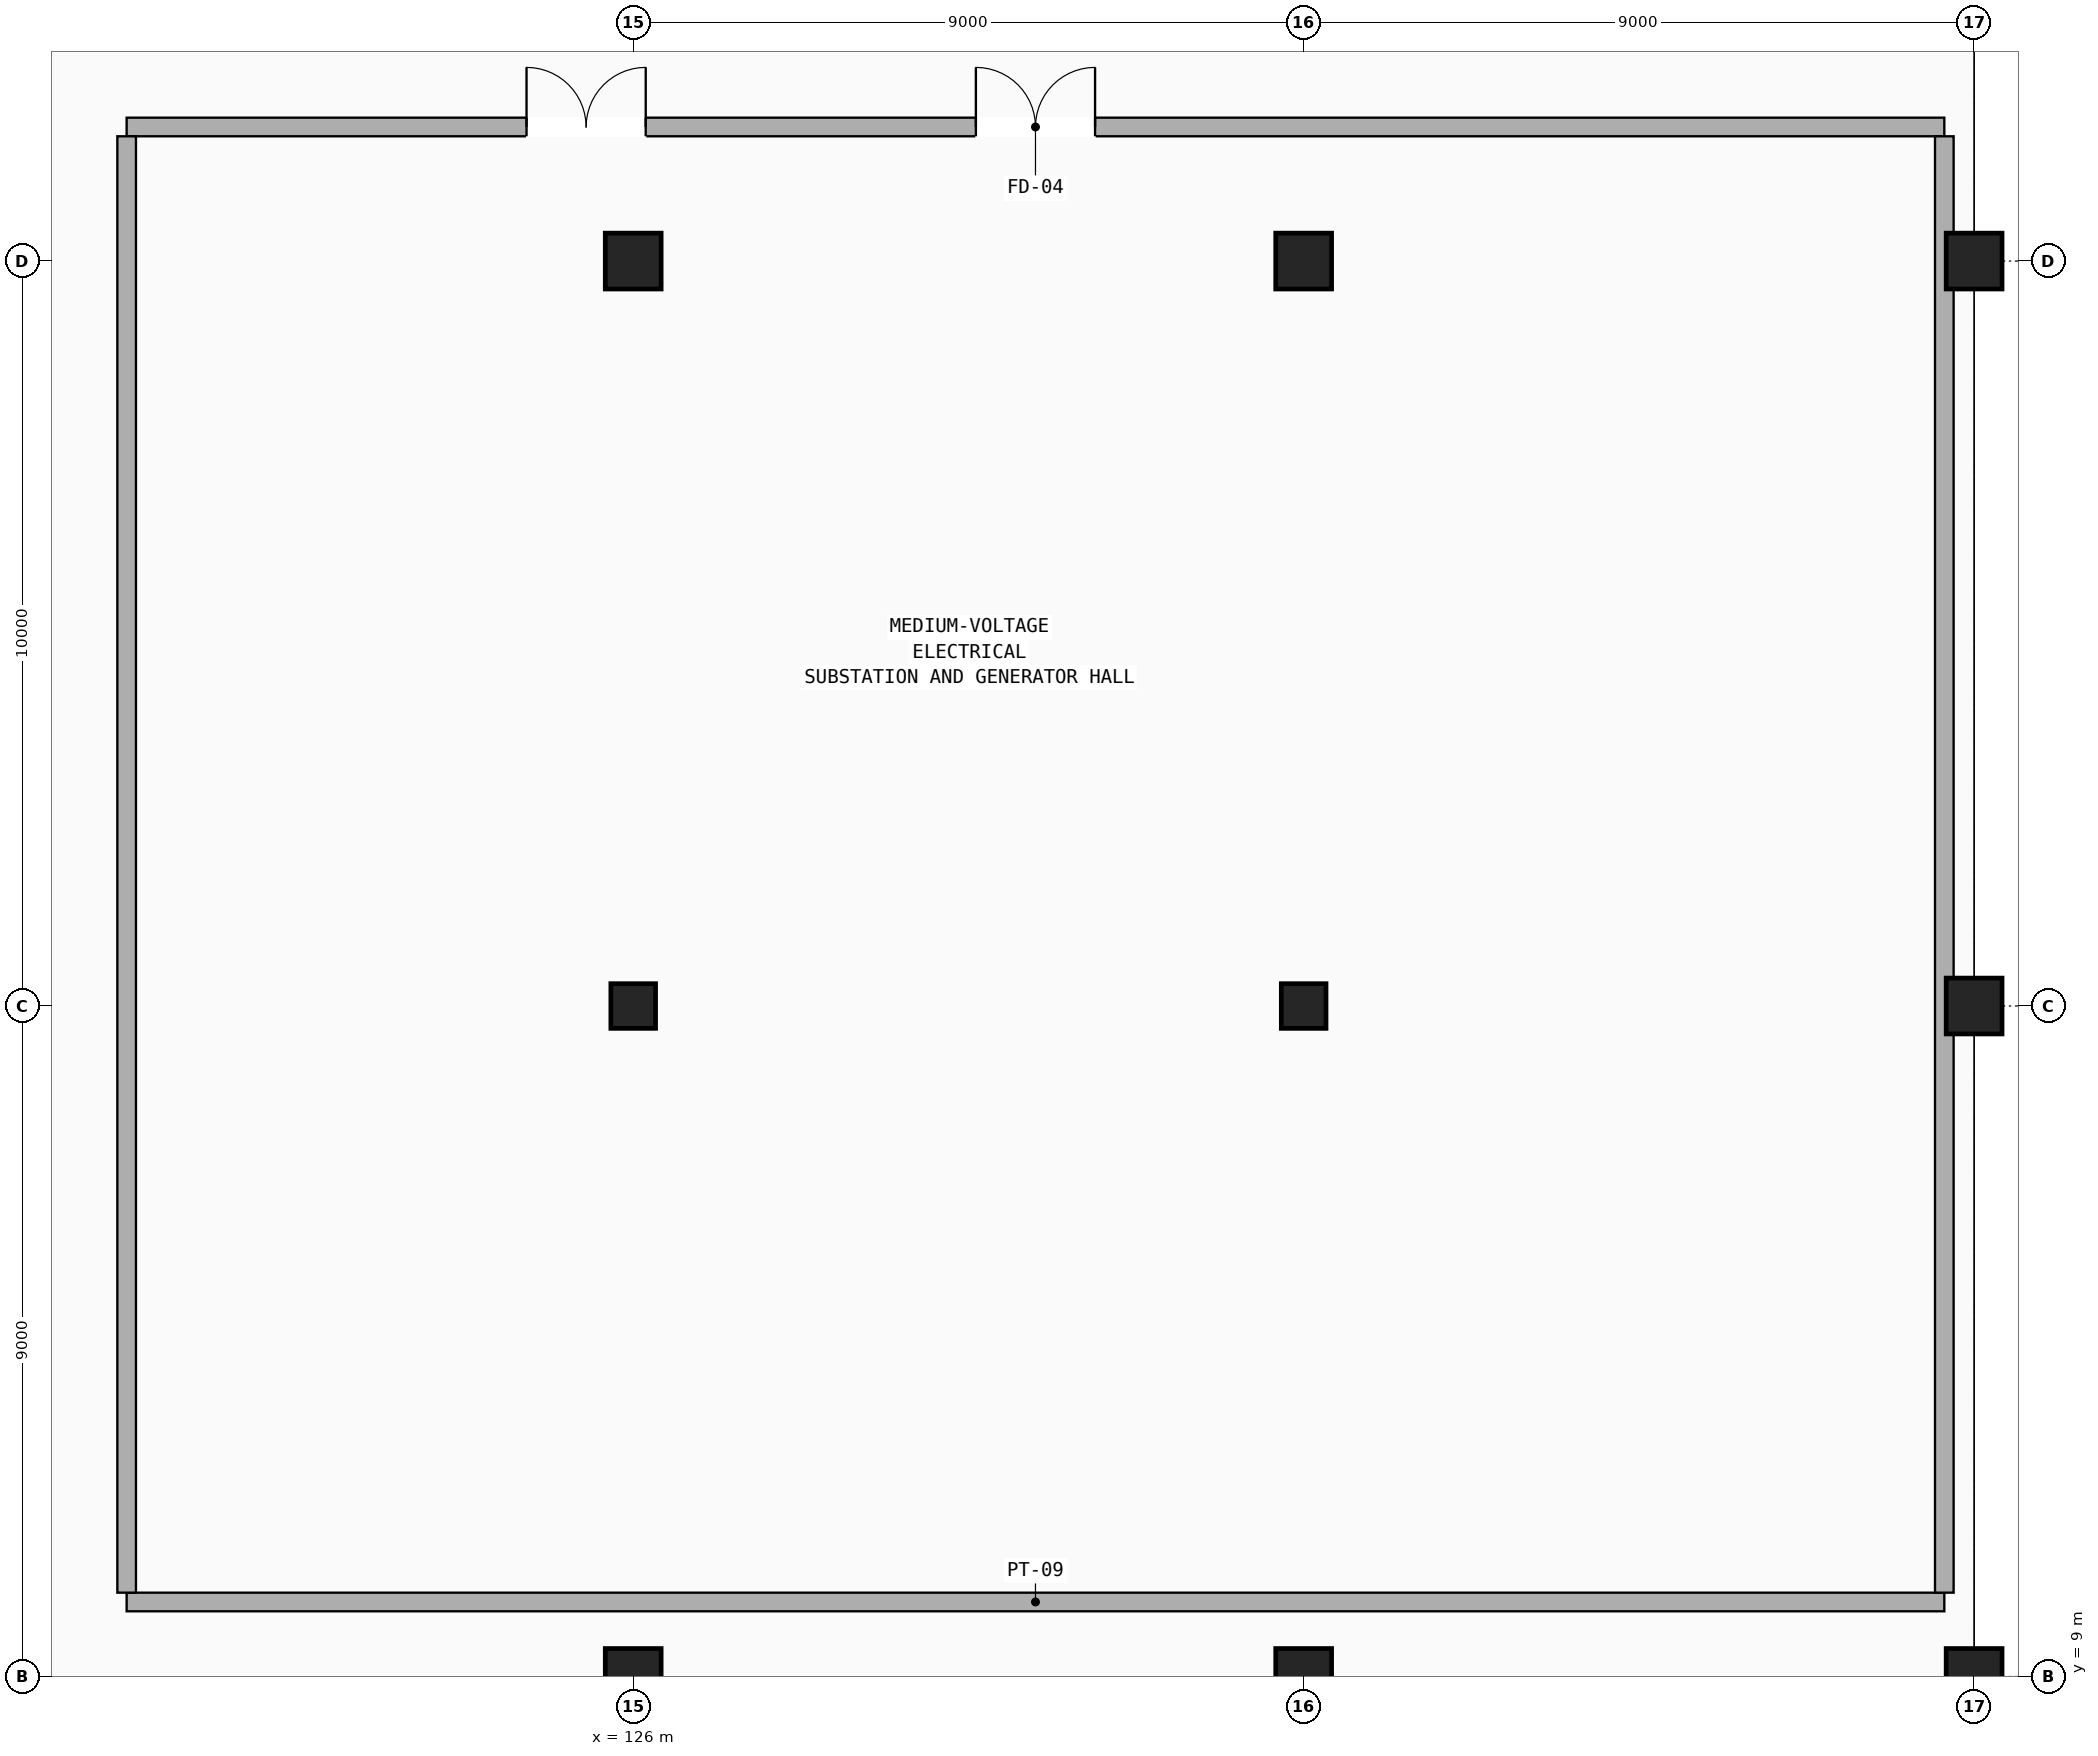
"""IFC4 building model, lengths in metres.
Left out: names, types, materials, properties, quantities, classifications, styles, units other than length and angle.
Written with IfcOpenShell. Run it as: python <this file> out.ifc"""

import sys

from ifc_helpers import new_model, si_unit, direction, frame, frame_2d, origin, origin_2d, place, context, subcontext, project, spatial, rectangle, extrude, element, fill, save


model = new_model("IFC4")
c1 = context("Model", 3, precision=1e-05, world=origin(), true_north=direction((0.0, 1.0)))
c2 = subcontext(c1, "Body", "Model", "MODEL_VIEW")
j1 = project(units=[si_unit("LENGTHUNIT", "METRE"), si_unit("PLANEANGLEUNIT", "RADIAN")], contexts=[c1])
p1 = place(None, origin())
s1 = spatial("IfcSite", under=j1, at=p1, CompositionType="ELEMENT")
p2 = place(p1, origin())
s2 = spatial("IfcBuilding", under=s1, at=p2, CompositionType="ELEMENT")
p3 = place(p2, frame((0.0, 0.0, -5.1)))
s3 = spatial("IfcBuildingStorey", under=s2, at=p3, CompositionType="ELEMENT", Elevation=-5.1)
p4 = place(p3, frame((126.0, 9.0, 0.0), z_axis=(0.0, 0.0, 1.0), x_axis=(1.0, 0.0, 0.0)))
e1 = element("IfcColumn", 1, at=p4, inside=s3, PredefinedType="COLUMN", context=c2, shape_type="SweptSolid", body=[
    extrude(rectangle(XDim=0.75, YDim=0.75, at=origin_2d()), origin(), (0.0, 0.0, 1.0), 5.1),
])
p5 = place(p3, frame((126.0, 18.0, 0.0), z_axis=(0.0, 0.0, 1.0), x_axis=(1.0, 0.0, 0.0)))
e2 = element("IfcColumn", 2, at=p5, inside=s3, PredefinedType="COLUMN", context=c2, shape_type="SweptSolid", body=[
    extrude(rectangle(XDim=0.6, YDim=0.6, at=origin_2d()), origin(), (0.0, 0.0, 1.0), 5.1),
])
for number, where, z_axis, x_axis in (
    (3, (126.0, 28.0, 0.0), (0.0, 0.0, 1.0), (1.0, 0.0, 0.0)),
    (4, (135.0, 9.0, 0.0), (0.0, 0.0, 1.0), (1.0, 0.0, 0.0)),
):
    element("IfcColumn", number, at=place(p3, frame(where, z_axis=z_axis, x_axis=x_axis)), inside=s3, PredefinedType="COLUMN", context=c2, shape_type="SweptSolid", body=[
        extrude(rectangle(XDim=0.75, YDim=0.75, at=origin_2d()), origin(), (0.0, 0.0, 1.0), 5.1),
    ])
p6 = place(p3, frame((135.0, 18.0, 0.0), z_axis=(0.0, 0.0, 1.0), x_axis=(1.0, 0.0, 0.0)))
e5 = element("IfcColumn", 5, at=p6, inside=s3, PredefinedType="COLUMN", context=c2, shape_type="SweptSolid", body=[
    extrude(rectangle(XDim=0.6, YDim=0.6, at=origin_2d()), origin(), (0.0, 0.0, 1.0), 5.1),
])
for number, where, z_axis, x_axis in (
    (6, (135.0, 28.0, 0.0), (0.0, 0.0, 1.0), (1.0, 0.0, 0.0)),
    (7, (144.0, 9.0, 0.0), (0.0, 0.0, 1.0), (1.0, 0.0, 0.0)),
    (8, (144.0, 18.0, 0.0), (0.0, 0.0, 1.0), (1.0, 0.0, 0.0)),
    (9, (144.0, 28.0, 0.0), (0.0, 0.0, 1.0), (1.0, 0.0, 0.0)),
):
    element("IfcColumn", number, at=place(p3, frame(where, z_axis=z_axis, x_axis=x_axis)), inside=s3, PredefinedType="COLUMN", context=c2, shape_type="SweptSolid", body=[
        extrude(rectangle(XDim=0.75, YDim=0.75, at=origin_2d()), origin(), (0.0, 0.0, 1.0), 5.1),
    ])
p7 = place(p3, frame((119.2, 10.0, 0.0), z_axis=(0.0, 0.0, 1.0), x_axis=(1.0, 0.0, 0.0)))
e10 = element("IfcWall", 10, at=p7, inside=s3, PredefinedType="PARTITIONING", context=c2, shape_type="SweptSolid", body=[
    extrude(rectangle(XDim=24.4, YDim=0.25, at=frame_2d((12.2, 0.0))), origin(), (0.0, 0.0, 1.0), 4.13),
])
p8 = place(p3, frame((119.2, 29.8, 0.0), z_axis=(0.0, 0.0, 1.0), x_axis=(1.0, 0.0, 0.0)))
e11 = element("IfcWall", 11, at=p8, inside=s3, PredefinedType="PARTITIONING", context=c2, shape_type="SweptSolid", body=[
    extrude(rectangle(XDim=24.4, YDim=0.25, at=frame_2d((12.2, 0.0))), origin(), (0.0, 0.0, 1.0), 3.91),
])
p9 = place(p8, frame((11.4, 0.0, 0.0)))
e12 = element("IfcOpeningElement", 12, at=p9, cuts=e11, PredefinedType="OPENING", context=c2, shape_type="SweptSolid", body=[
    extrude(rectangle(XDim=1.6, YDim=2.25, at=frame_2d((0.8, 1.125))), frame((0.0, 0.135, 0.0), z_axis=(0.0, -1.0, 0.0), x_axis=(1.0, 0.0, 0.0)), (0.0, 0.0, 1.0), 0.27),
])
p10 = place(p8, frame((5.368, 0.0, 0.0)))
e13 = element("IfcOpeningElement", 13, at=p10, cuts=e11, PredefinedType="OPENING", context=c2, shape_type="SweptSolid", body=[
    extrude(rectangle(XDim=1.6, YDim=2.25, at=frame_2d((0.8, 1.125))), frame((0.0, 0.135, 0.0), z_axis=(0.0, -1.0, 0.0), x_axis=(1.0, 0.0, 0.0)), (0.0, 0.0, 1.0), 0.27),
])
for number, where, z_axis, x_axis in (
    (14, (119.2, 10.125, 0.0), (0.0, 0.0, 1.0), (0.0, 1.0, 0.0)),
    (15, (143.6, 10.125, 0.0), (0.0, 0.0, 1.0), (0.0, 1.0, 0.0)),
):
    element("IfcWall", number, at=place(p3, frame(where, z_axis=z_axis, x_axis=x_axis)), inside=s3, PredefinedType="PARTITIONING", context=c2, shape_type="SweptSolid", body=[
        extrude(rectangle(XDim=19.55, YDim=0.25, at=frame_2d((9.775, 0.0))), origin(), (0.0, 0.0, 1.0), 3.76),
    ])
p11 = place(p9, origin())
e16 = element("IfcDoor", 16, at=p11, inside=s3, OperationType="DOUBLE_DOOR_SINGLE_SWING", PredefinedType="DOOR", context=c2, shape_type="SweptSolid", body=[
    extrude(rectangle(XDim=1.6, YDim=2.25, at=frame_2d((0.8, 1.125))), frame((0.0, 0.025, 0.0), z_axis=(0.0, -1.0, 0.0), x_axis=(1.0, 0.0, 0.0)), (0.0, 0.0, 1.0), 0.05),
])
fill(e12, e16)
p12 = place(p10, origin())
e17 = element("IfcDoor", 17, at=p12, inside=s3, OperationType="DOUBLE_DOOR_SINGLE_SWING", PredefinedType="DOOR", context=c2, shape_type="SweptSolid", body=[
    extrude(rectangle(XDim=1.6, YDim=2.25, at=frame_2d((0.8, 1.125))), frame((0.0, 0.025, 0.0), z_axis=(0.0, -1.0, 0.0), x_axis=(1.0, 0.0, 0.0)), (0.0, 0.0, 1.0), 0.05),
])
fill(e13, e17)
save(model, sys.argv[1])
